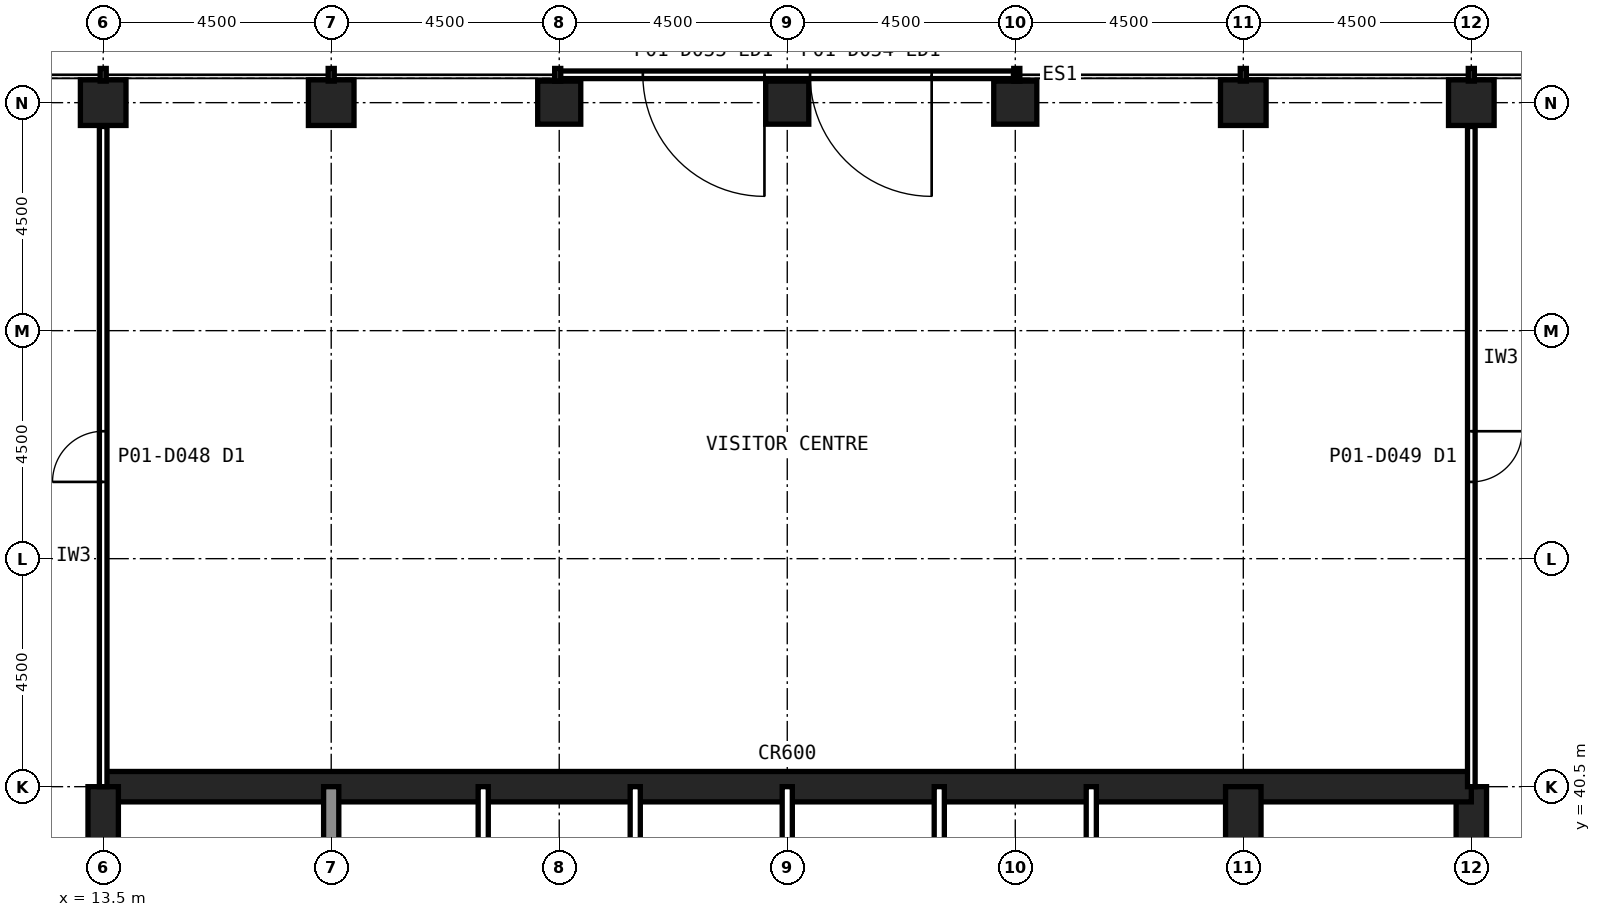
"""IFC4 building model, lengths in metres.
Left out: names, types, materials, properties, quantities, classifications, styles, units other than length and angle.
Written with IfcOpenShell. Run it as: python <this file> out.ifc"""

import sys

from ifc_helpers import new_model, si_unit, direction, frame, frame_2d, origin, origin_2d, place, context, subcontext, project, spatial, rectangle, hollow_rectangle, extrude, element, fill, save


model = new_model("IFC4")
c1 = context("Model", 3, precision=1e-05, world=origin(), true_north=direction((0.0, 1.0)))
c2 = subcontext(c1, "Body", "Model", "MODEL_VIEW")
j1 = project(units=[si_unit("LENGTHUNIT", "METRE"), si_unit("PLANEANGLEUNIT", "RADIAN")], contexts=[c1])
p1 = place(None, origin())
s1 = spatial("IfcSite", under=j1, at=p1, CompositionType="ELEMENT")
p2 = place(p1, origin())
s2 = spatial("IfcBuilding", under=s1, at=p2, CompositionType="ELEMENT")
p3 = place(p2, origin())
s3 = spatial("IfcBuildingStorey", under=s2, at=p3, CompositionType="ELEMENT", Elevation=0.0)
for number, where, z_axis, x_axis in (
    (1, (40.5, 54.0, -0.25), (0.0, 0.0, 1.0), (1.0, 0.0, 0.0)),
    (2, (36.0, 54.0, -0.25), (0.0, 0.0, 1.0), (1.0, 0.0, 0.0)),
):
    element("IfcColumn", number, at=place(p3, frame(where, z_axis=z_axis, x_axis=x_axis)), inside=s3, PredefinedType="COLUMN", context=c2, shape_type="SweptSolid", body=[
        extrude(hollow_rectangle(XDim=0.9, YDim=0.9, WallThickness=0.063, at=origin_2d()), origin(), (0.0, 0.0, 1.0), 6.25),
    ])
for number, where, z_axis, x_axis in (
    (3, (31.5, 54.0, -0.25), (0.0, 0.0, 1.0), (1.0, 0.0, 0.0)),
    (4, (27.0, 54.0, -0.25), (0.0, 0.0, 1.0), (1.0, 0.0, 0.0)),
    (5, (22.5, 54.0, -0.25), (0.0, 0.0, 1.0), (1.0, 0.0, 0.0)),
):
    element("IfcColumn", number, at=place(p3, frame(where, z_axis=z_axis, x_axis=x_axis)), inside=s3, PredefinedType="COLUMN", context=c2, shape_type="SweptSolid", body=[
        extrude(hollow_rectangle(XDim=0.85, YDim=0.85, WallThickness=0.05, at=origin_2d()), origin(), (0.0, 0.0, 1.0), 6.25),
    ])
for number, where, z_axis, x_axis in (
    (6, (18.0, 54.0, -0.25), (0.0, 0.0, 1.0), (1.0, 0.0, 0.0)),
    (7, (13.5, 54.0, -0.25), (0.0, 0.0, 1.0), (1.0, 0.0, 0.0)),
):
    element("IfcColumn", number, at=place(p3, frame(where, z_axis=z_axis, x_axis=x_axis)), inside=s3, PredefinedType="COLUMN", context=c2, shape_type="SweptSolid", body=[
        extrude(hollow_rectangle(XDim=0.9, YDim=0.9, WallThickness=0.063, at=origin_2d()), origin(), (0.0, 0.0, 1.0), 6.25),
    ])
p4 = place(p3, frame((40.5, 13.5, -0.25), z_axis=(0.0, 0.0, 1.0), x_axis=(0.0, 1.0, 0.0)))
e8 = element("IfcWall", 8, at=p4, inside=s3, PredefinedType="SHEAR", context=c2, shape_type="SweptSolid", body=[
    extrude(rectangle(XDim=27.0, YDim=0.6, at=frame_2d((13.5, 0.0))), origin(), (0.0, 0.0, 1.0), 6.25),
])
p5 = place(p4, frame((5.85, 0.0, 0.25)))
e9 = element("IfcOpeningElement", 9, at=p5, cuts=e8, PredefinedType="OPENING", context=c2, shape_type="SweptSolid", body=[
    extrude(rectangle(XDim=1.8, YDim=2.1, at=frame_2d((0.9, 1.05))), frame((0.0, 0.31, 0.0), z_axis=(0.0, -1.0, 0.0), x_axis=(1.0, 0.0, 0.0)), (0.0, 0.0, 1.0), 0.62),
])
p6 = place(p4, frame((19.65, 0.0, 0.25)))
e10 = element("IfcOpeningElement", 10, at=p6, cuts=e8, PredefinedType="OPENING", context=c2, shape_type="SweptSolid", body=[
    extrude(rectangle(XDim=1.2, YDim=2.1, at=frame_2d((0.6, 1.05))), frame((0.0, 0.31, 0.0), z_axis=(0.0, -1.0, 0.0), x_axis=(1.0, 0.0, 0.0)), (0.0, 0.0, 1.0), 0.62),
])
p7 = place(p3, frame((40.5, 40.5, -0.25), z_axis=(0.0, 0.0, 1.0), x_axis=(-1.0, 0.0, 0.0)))
e11 = element("IfcWall", 11, at=p7, inside=s3, PredefinedType="SHEAR", context=c2, shape_type="SweptSolid", body=[
    extrude(rectangle(XDim=27.0, YDim=0.6, at=frame_2d((13.5, 0.0))), origin(), (0.0, 0.0, 1.0), 6.25),
])
p8 = place(p3, frame((13.5, 40.5, -0.25), z_axis=(0.0, 0.0, 1.0), x_axis=(0.0, -1.0, 0.0)))
e12 = element("IfcWall", 12, at=p8, inside=s3, PredefinedType="SHEAR", context=c2, shape_type="SweptSolid", body=[
    extrude(rectangle(XDim=27.0, YDim=0.6, at=frame_2d((13.5, 0.0))), origin(), (0.0, 0.0, 1.0), 6.25),
])
p9 = place(p8, frame((19.65, 0.0, 0.25)))
e13 = element("IfcOpeningElement", 13, at=p9, cuts=e12, PredefinedType="OPENING", context=c2, shape_type="SweptSolid", body=[
    extrude(rectangle(XDim=1.2, YDim=2.1, at=frame_2d((0.6, 1.05))), frame((0.0, 0.31, 0.0), z_axis=(0.0, -1.0, 0.0), x_axis=(1.0, 0.0, 0.0)), (0.0, 0.0, 1.0), 0.62),
])
p10 = place(p8, frame((5.85, 0.0, 0.25)))
e14 = element("IfcOpeningElement", 14, at=p10, cuts=e12, PredefinedType="OPENING", context=c2, shape_type="SweptSolid", body=[
    extrude(rectangle(XDim=1.8, YDim=2.1, at=frame_2d((0.9, 1.05))), frame((0.0, 0.31, 0.0), z_axis=(0.0, -1.0, 0.0), x_axis=(1.0, 0.0, 0.0)), (0.0, 0.0, 1.0), 0.62),
])
p11 = place(p3, frame((18.0, 36.0, -0.25), z_axis=(0.0, 0.0, 1.0), x_axis=(0.0, 1.0, 0.0)))
e15 = element("IfcWall", 15, at=p11, inside=s3, PredefinedType="SOLIDWALL", context=c2, shape_type="SweptSolid", body=[
    extrude(rectangle(XDim=4.5, YDim=0.3, at=frame_2d((2.25, 0.0))), origin(), (0.0, 0.0, 1.0), 6.05),
])
p12 = place(p3, frame((36.0, 22.5, -0.25), z_axis=(0.0, 0.0, 1.0), x_axis=(0.0, 1.0, 0.0)))
e16 = element("IfcWall", 16, at=p12, inside=s3, PredefinedType="SHEAR", context=c2, shape_type="SweptSolid", body=[
    extrude(rectangle(XDim=18.0, YDim=0.7, at=frame_2d((9.0, 0.0))), origin(), (0.0, 0.0, 1.0), 6.25),
])
p13 = place(p3, frame((31.5, 54.55, 0.0), z_axis=(0.0, 0.0, 1.0), x_axis=(-1.0, 0.0, 0.0)))
e17 = element("IfcWall", 17, at=p13, inside=s3, PredefinedType="USERDEFINED", context=c2, shape_type="SweptSolid", body=[
    extrude(rectangle(XDim=9.0, YDim=0.15, at=frame_2d((4.5, 0.0))), origin(), (0.0, 0.0, 1.0), 6.0),
])
p14 = place(p13, frame((1.65, 0.0, 0.0)))
e18 = element("IfcOpeningElement", 18, at=p14, cuts=e17, PredefinedType="OPENING", context=c2, shape_type="SweptSolid", body=[
    extrude(rectangle(XDim=2.4, YDim=2.7, at=frame_2d((1.2, 1.35))), frame((0.0, 0.085, 0.0), z_axis=(0.0, -1.0, 0.0), x_axis=(1.0, 0.0, 0.0)), (0.0, 0.0, 1.0), 0.17),
])
p15 = place(p13, frame((4.95, 0.0, 0.0)))
e19 = element("IfcOpeningElement", 19, at=p15, cuts=e17, PredefinedType="OPENING", context=c2, shape_type="SweptSolid", body=[
    extrude(rectangle(XDim=2.4, YDim=2.7, at=frame_2d((1.2, 1.35))), frame((0.0, 0.085, 0.0), z_axis=(0.0, -1.0, 0.0), x_axis=(1.0, 0.0, 0.0)), (0.0, 0.0, 1.0), 0.17),
])
for number, where, z_axis, x_axis in (
    (20, (21.0, 36.0, -0.25), (0.0, 0.0, 1.0), (0.0, 1.0, 0.0)),
    (21, (24.0, 36.0, -0.25), (0.0, 0.0, 1.0), (0.0, 1.0, 0.0)),
    (22, (27.0, 36.0, -0.25), (0.0, 0.0, 1.0), (0.0, 1.0, 0.0)),
    (23, (30.0, 36.0, -0.25), (0.0, 0.0, 1.0), (0.0, 1.0, 0.0)),
    (24, (33.0, 36.0, -0.25), (0.0, 0.0, 1.0), (0.0, 1.0, 0.0)),
):
    element("IfcWall", number, at=place(p3, frame(where, z_axis=z_axis, x_axis=x_axis)), inside=s3, PredefinedType="PARTITIONING", context=c2, shape_type="SweptSolid", body=[
        extrude(rectangle(XDim=4.5, YDim=0.2, at=frame_2d((2.25, 0.0))), origin(), (0.0, 0.0, 1.0), 6.05),
    ])
p16 = place(p3, frame((40.5, 53.53, 0.0), z_axis=(0.0, 0.0, 1.0), x_axis=(0.0, -1.0, 0.0)))
e25 = element("IfcWall", 25, at=p16, inside=s3, PredefinedType="PARTITIONING", context=c2, shape_type="SweptSolid", body=[
    extrude(rectangle(XDim=13.03, YDim=0.15, at=frame_2d((6.515, 0.0))), origin(), (0.0, 0.0, 1.0), 4.881),
])
p17 = place(p16, frame((6.015, 0.0, 0.0)))
e26 = element("IfcOpeningElement", 26, at=p17, cuts=e25, PredefinedType="OPENING", context=c2, shape_type="SweptSolid", body=[
    extrude(rectangle(XDim=1.0, YDim=2.1, at=frame_2d((0.5, 1.05))), frame((0.0, 0.085, 0.0), z_axis=(0.0, -1.0, 0.0), x_axis=(1.0, 0.0, 0.0)), (0.0, 0.0, 1.0), 0.17),
])
p18 = place(p3, frame((13.5, 40.5, 0.0), z_axis=(0.0, 0.0, 1.0), x_axis=(0.0, 1.0, 0.0)))
e27 = element("IfcWall", 27, at=p18, inside=s3, PredefinedType="PARTITIONING", context=c2, shape_type="SweptSolid", body=[
    extrude(rectangle(XDim=13.03, YDim=0.15, at=frame_2d((6.515, 0.0))), origin(), (0.0, 0.0, 1.0), 4.881),
])
p19 = place(p18, frame((6.015, 0.0, 0.0)))
e28 = element("IfcOpeningElement", 28, at=p19, cuts=e27, PredefinedType="OPENING", context=c2, shape_type="SweptSolid", body=[
    extrude(rectangle(XDim=1.0, YDim=2.1, at=frame_2d((0.5, 1.05))), frame((0.0, 0.085, 0.0), z_axis=(0.0, -1.0, 0.0), x_axis=(1.0, 0.0, 0.0)), (0.0, 0.0, 1.0), 0.17),
])
p20 = place(p14, origin())
e29 = element("IfcDoor", 29, at=p20, inside=s3, OperationType="SINGLE_SWING_LEFT", PredefinedType="DOOR", context=c2, shape_type="SweptSolid", body=[
    extrude(rectangle(XDim=2.4, YDim=2.7, at=frame_2d((1.2, 1.35))), frame((0.0, 0.025, 0.0), z_axis=(0.0, -1.0, 0.0), x_axis=(1.0, 0.0, 0.0)), (0.0, 0.0, 1.0), 0.05),
])
fill(e18, e29)
p21 = place(p15, origin())
e30 = element("IfcDoor", 30, at=p21, inside=s3, OperationType="SINGLE_SWING_LEFT", PredefinedType="DOOR", context=c2, shape_type="SweptSolid", body=[
    extrude(rectangle(XDim=2.4, YDim=2.7, at=frame_2d((1.2, 1.35))), frame((0.0, 0.025, 0.0), z_axis=(0.0, -1.0, 0.0), x_axis=(1.0, 0.0, 0.0)), (0.0, 0.0, 1.0), 0.05),
])
fill(e19, e30)
p22 = place(p17, origin())
e31 = element("IfcDoor", 31, at=p22, inside=s3, OperationType="SINGLE_SWING_LEFT", PredefinedType="DOOR", context=c2, shape_type="SweptSolid", body=[
    extrude(rectangle(XDim=1.0, YDim=2.1, at=frame_2d((0.5, 1.05))), frame((0.0, 0.025, 0.0), z_axis=(0.0, -1.0, 0.0), x_axis=(1.0, 0.0, 0.0)), (0.0, 0.0, 1.0), 0.05),
])
fill(e26, e31)
p23 = place(p19, origin())
e32 = element("IfcDoor", 32, at=p23, inside=s3, OperationType="SINGLE_SWING_LEFT", PredefinedType="DOOR", context=c2, shape_type="SweptSolid", body=[
    extrude(rectangle(XDim=1.0, YDim=2.1, at=frame_2d((0.5, 1.05))), frame((0.0, 0.025, 0.0), z_axis=(0.0, -1.0, 0.0), x_axis=(1.0, 0.0, 0.0)), (0.0, 0.0, 1.0), 0.05),
])
fill(e28, e32)
save(model, sys.argv[1])
